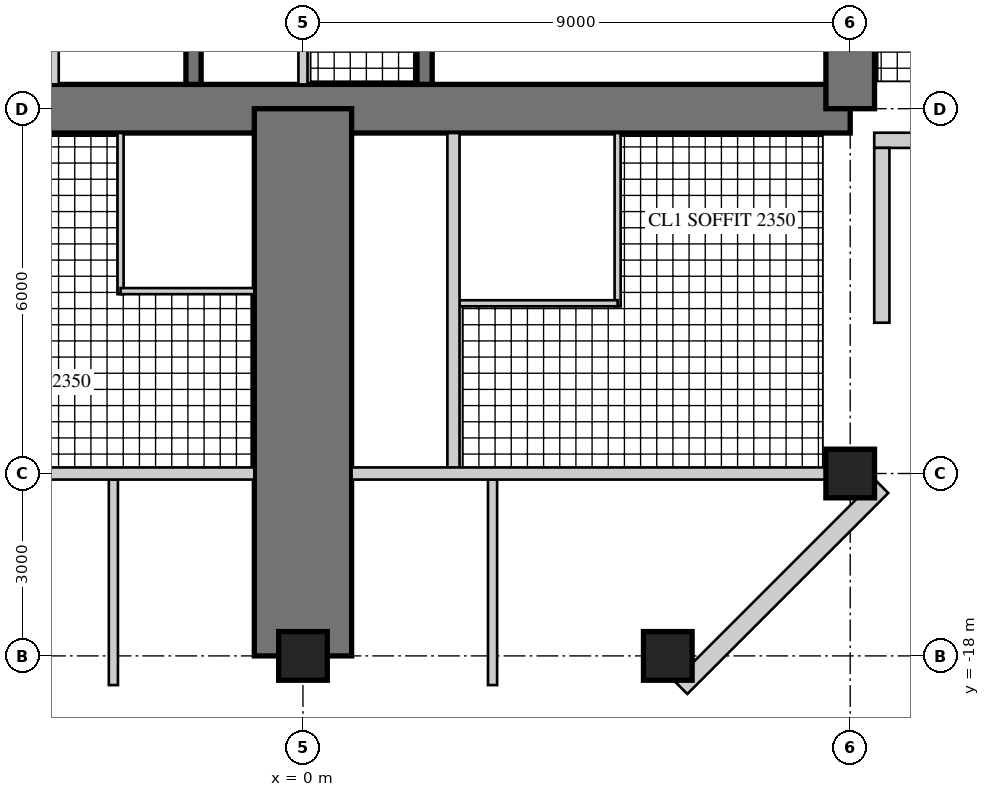
"""IFC4 building model, lengths in metres.
Left out: names, types, materials, properties, quantities, classifications, styles, units other than length and angle.
Written with IfcOpenShell. Run it as: python <this file> out.ifc"""

import sys

from ifc_helpers import new_model, si_unit, direction, frame, frame_2d, origin, origin_2d, place, context, subcontext, project, spatial, rectangle, hollow_rectangle, extrude, element, fill, save


model = new_model("IFC4")
c1 = context("Model", 3, precision=1e-05, world=origin(), true_north=direction((0.0, 1.0)))
c2 = subcontext(c1, "Body", "Model", "MODEL_VIEW")
j1 = project(units=[si_unit("LENGTHUNIT", "METRE"), si_unit("PLANEANGLEUNIT", "RADIAN")], contexts=[c1])
p1 = place(None, origin())
s1 = spatial("IfcSite", under=j1, at=p1, CompositionType="ELEMENT")
p2 = place(p1, origin())
s2 = spatial("IfcBuilding", under=s1, at=p2, CompositionType="ELEMENT")
p3 = place(p2, frame((0.0, 0.0, 225.5)))
s3 = spatial("IfcBuildingStorey", under=s2, at=p3, CompositionType="ELEMENT", Elevation=225.5)
p4 = place(p3, frame((-9.0, -9.0, 0.0), z_axis=(0.0, 0.0, 1.0), x_axis=(1.0, 0.0, 0.0)))
e1 = element("IfcWall", 1, at=p4, inside=s3, PredefinedType="SHEAR", context=c2, shape_type="SweptSolid", body=[
    extrude(rectangle(XDim=18.0, YDim=0.8, at=frame_2d((9.0, 0.0))), origin(), (0.0, 0.0, 1.0), 3.4),
])
p5 = place(p4, frame((9.8, 0.0, 0.0)))
e2 = element("IfcOpeningElement", 2, at=p5, cuts=e1, PredefinedType="OPENING", context=c2, shape_type="SweptSolid", body=[
    extrude(rectangle(XDim=1.0, YDim=2.4, at=frame_2d((0.5, 1.2))), frame((0.0, 0.41, 0.0), z_axis=(0.0, -1.0, 0.0), x_axis=(1.0, 0.0, 0.0)), (0.0, 0.0, 1.0), 0.82),
])
p6 = place(p3, frame((9.0, -9.0, 0.0), z_axis=(0.0, 0.0, 1.0), x_axis=(0.0, 1.0, 0.0)))
e3 = element("IfcWall", 3, at=p6, inside=s3, PredefinedType="SHEAR", context=c2, shape_type="SweptSolid", body=[
    extrude(rectangle(XDim=18.0, YDim=0.8, at=frame_2d((9.0, 0.0))), origin(), (0.0, 0.0, 1.0), 3.4),
])
p7 = place(p6, frame((9.8, 0.0, 0.0)))
e4 = element("IfcOpeningElement", 4, at=p7, cuts=e3, PredefinedType="OPENING", context=c2, shape_type="SweptSolid", body=[
    extrude(rectangle(XDim=1.0, YDim=2.4, at=frame_2d((0.5, 1.2))), frame((0.0, 0.41, 0.0), z_axis=(0.0, -1.0, 0.0), x_axis=(1.0, 0.0, 0.0)), (0.0, 0.0, 1.0), 0.82),
])
p8 = place(p3, frame((-1.8, -1.875, 0.0), z_axis=(0.0, 0.0, 1.0), x_axis=(0.0, -1.0, 0.0)))
e5 = element("IfcWall", 5, at=p8, inside=s3, PredefinedType="SHEAR", context=c2, shape_type="SweptSolid", body=[
    extrude(rectangle(XDim=6.725, YDim=0.25, at=frame_2d((3.363, 0.0))), origin(), (0.0, 0.0, 1.0), 3.4),
])
p9 = place(p8, frame((1.875, 0.0, 0.0)))
e6 = element("IfcOpeningElement", 6, at=p9, cuts=e5, PredefinedType="OPENING", context=c2, shape_type="SweptSolid", body=[
    extrude(rectangle(XDim=1.6, YDim=2.4, at=frame_2d((0.8, 1.2))), frame((0.0, 0.135, 0.0), z_axis=(0.0, -1.0, 0.0), x_axis=(1.0, 0.0, 0.0)), (0.0, 0.0, 1.0), 0.27),
])
p10 = place(p3, frame((-4.117, -5.975, 0.0), z_axis=(0.0, 0.0, 1.0), x_axis=(0.0, -1.0, 0.0)))
e7 = element("IfcWall", 7, at=p10, inside=s3, PredefinedType="PARTITIONING", context=c2, shape_type="SweptSolid", body=[
    extrude(rectangle(XDim=2.625, YDim=0.2, at=frame_2d((1.312, 0.0))), origin(), (0.0, 0.0, 1.0), 3.4),
])
p11 = place(p3, frame((2.0, -1.675, 0.0), z_axis=(0.0, 0.0, 1.0), x_axis=(0.0, -1.0, 0.0)))
e8 = element("IfcWall", 8, at=p11, inside=s3, PredefinedType="SHEAR", context=c2, shape_type="SweptSolid", body=[
    extrude(rectangle(XDim=6.925, YDim=0.25, at=frame_2d((3.462, 0.0))), origin(), (0.0, 0.0, 1.0), 3.4),
])
p12 = place(p11, frame((0.725, 0.0, 0.0)))
e9 = element("IfcOpeningElement", 9, at=p12, cuts=e8, PredefinedType="OPENING", context=c2, shape_type="SweptSolid", body=[
    extrude(rectangle(XDim=1.0, YDim=2.1, at=frame_2d((0.5, 1.05))), frame((0.0, 0.135, 0.0), z_axis=(0.0, -1.0, 0.0), x_axis=(1.0, 0.0, 0.0)), (0.0, 0.0, 1.0), 0.27),
])
p13 = place(p3, frame((0.0, -9.0, 0.0), z_axis=(0.0, 0.0, 1.0), x_axis=(0.0, -1.0, 0.0)))
e10 = element("IfcWall", 10, at=p13, inside=s3, PredefinedType="SHEAR", context=c2, shape_type="SweptSolid", body=[
    extrude(rectangle(XDim=9.0, YDim=1.6, at=frame_2d((4.5, 0.0))), origin(), (0.0, 0.0, 1.0), 3.4),
])
p14 = place(p13, frame((3.8, 0.0, 0.0)))
e11 = element("IfcOpeningElement", 11, at=p14, cuts=e10, PredefinedType="OPENING", context=c2, shape_type="SweptSolid", body=[
    extrude(rectangle(XDim=1.0, YDim=2.15, at=frame_2d((0.5, 1.075))), frame((0.0, 0.81, 0.0), z_axis=(0.0, -1.0, 0.0), x_axis=(1.0, 0.0, 0.0)), (0.0, 0.0, 1.0), 1.62),
])
p15 = place(p13, frame((7.0, 0.0, 0.0)))
e12 = element("IfcOpeningElement", 12, at=p15, cuts=e10, PredefinedType="OPENING", context=c2, shape_type="SweptSolid", body=[
    extrude(rectangle(XDim=1.0, YDim=2.2, at=frame_2d((0.5, 1.1))), frame((0.0, 0.81, 0.0), z_axis=(0.0, -1.0, 0.0), x_axis=(1.0, 0.0, 0.0)), (0.0, 0.0, 1.0), 1.62),
])
for number, where, z_axis, x_axis in (
    (13, (9.0, -15.0, 0.0), (0.0, 0.0, 1.0), (1.0, 0.0, 0.0)),
    (14, (0.0, -18.0, 0.0), (0.0, 0.0, 1.0), (1.0, 0.0, 0.0)),
    (15, (6.0, -18.0, 0.0), (0.0, 0.0, 1.0), (1.0, 0.0, 0.0)),
):
    element("IfcColumn", number, at=place(p3, frame(where, z_axis=z_axis, x_axis=x_axis)), inside=s3, PredefinedType="COLUMN", context=c2, shape_type="SweptSolid", body=[
        extrude(rectangle(XDim=0.8, YDim=0.8, at=origin_2d()), origin(), (0.0, 0.0, 1.0), 3.4),
    ])
p16 = place(p3, frame((9.395, -9.52, 0.0), z_axis=(0.0, 0.0, 1.0), x_axis=(1.0, 0.0, 0.0)))
e16 = element("IfcWall", 16, at=p16, inside=s3, PredefinedType="SOLIDWALL", context=c2, shape_type="SweptSolid", body=[
    extrude(rectangle(XDim=3.125, YDim=0.25, at=frame_2d((1.562, 0.0))), origin(), (0.0, 0.0, 1.0), 3.22),
])
p17 = place(p16, frame((0.6, 0.0, 0.0)))
e17 = element("IfcOpeningElement", 17, at=p17, cuts=e16, PredefinedType="OPENING", context=c2, shape_type="SweptSolid", body=[
    extrude(rectangle(XDim=1.0, YDim=2.2, at=frame_2d((0.5, 1.1))), frame((0.0, 0.135, 0.0), z_axis=(0.0, -1.0, 0.0), x_axis=(1.0, 0.0, 0.0)), (0.0, 0.0, 1.0), 0.27),
])
p18 = place(p3, frame((6.215, -18.52, 0.0), z_axis=(0.0, 0.0, 1.0), x_axis=(0.707106781187, 0.707106781187, 0.0)))
e18 = element("IfcWall", 18, at=p18, inside=s3, PredefinedType="SOLIDWALL", context=c2, shape_type="SweptSolid", body=[
    extrude(rectangle(XDim=4.674, YDim=0.3, at=frame_2d((2.337, 0.0))), origin(), (0.0, 0.0, 1.0), 3.22),
])
p19 = place(p18, frame((1.887, 0.0, 0.3)))
e19 = element("IfcOpeningElement", 19, at=p19, cuts=e18, PredefinedType="OPENING", context=c2, shape_type="SweptSolid", body=[
    extrude(rectangle(XDim=0.9, YDim=2.4, at=frame_2d((0.45, 1.2))), frame((0.0, 0.16, 0.0), z_axis=(0.0, -1.0, 0.0), x_axis=(1.0, 0.0, 0.0)), (0.0, 0.0, 1.0), 0.32),
])
p20 = place(p3, frame((9.52, -12.52, 0.0), z_axis=(0.0, 0.0, 1.0), x_axis=(0.0, 1.0, 0.0)))
e20 = element("IfcWall", 20, at=p20, inside=s3, PredefinedType="SOLIDWALL", context=c2, shape_type="SweptSolid", body=[
    extrude(rectangle(XDim=2.875, YDim=0.25, at=frame_2d((1.438, 0.0))), origin(), (0.0, 0.0, 1.0), 3.22),
])
p21 = place(p20, frame((0.6, 0.0, 0.0)))
e21 = element("IfcOpeningElement", 21, at=p21, cuts=e20, PredefinedType="OPENING", context=c2, shape_type="SweptSolid", body=[
    extrude(rectangle(XDim=1.0, YDim=2.2, at=frame_2d((0.5, 1.1))), frame((0.0, 0.135, 0.0), z_axis=(0.0, -1.0, 0.0), x_axis=(1.0, 0.0, 0.0)), (0.0, 0.0, 1.0), 0.27),
])
p22 = place(p3, frame((0.0, -5.675, 0.0), z_axis=(0.0, 0.0, 1.0), x_axis=(0.0, -1.0, 0.0)))
e22 = element("IfcWall", 22, at=p22, inside=s3, PredefinedType="PARTITIONING", context=c2, shape_type="SweptSolid", body=[
    extrude(rectangle(XDim=2.925, YDim=0.15, at=frame_2d((1.462, 0.0))), origin(), (0.0, 0.0, 1.0), 3.22),
])
p23 = place(p22, frame((0.4, 0.0, 0.0)))
e23 = element("IfcOpeningElement", 23, at=p23, cuts=e22, PredefinedType="OPENING", context=c2, shape_type="SweptSolid", body=[
    extrude(rectangle(XDim=1.0, YDim=2.1, at=frame_2d((0.5, 1.05))), frame((0.0, 0.085, 0.0), z_axis=(0.0, -1.0, 0.0), x_axis=(1.0, 0.0, 0.0)), (0.0, 0.0, 1.0), 0.17),
])
p24 = place(p3, frame((5.175, -9.4, 0.0), z_axis=(0.0, 0.0, 1.0), x_axis=(0.0, -1.0, 0.0)))
e24 = element("IfcWall", 24, at=p24, inside=s3, PredefinedType="PARTITIONING", context=c2, shape_type="SweptSolid", body=[
    extrude(rectangle(XDim=2.85, YDim=0.1, at=frame_2d((1.425, 0.0))), origin(), (0.0, 0.0, 1.0), 3.22),
])
p25 = place(p3, frame((2.575, -12.2, 0.0), z_axis=(0.0, 0.0, 1.0), x_axis=(1.0, 0.0, 0.0)))
e25 = element("IfcWall", 25, at=p25, inside=s3, PredefinedType="PARTITIONING", context=c2, shape_type="SweptSolid", body=[
    extrude(rectangle(XDim=2.6, YDim=0.1, at=frame_2d((1.3, 0.0))), origin(), (0.0, 0.0, 1.0), 3.22),
])
p26 = place(p25, frame((0.55, 0.0, 0.0)))
e26 = element("IfcOpeningElement", 26, at=p26, cuts=e25, PredefinedType="OPENING", context=c2, shape_type="SweptSolid", body=[
    extrude(rectangle(XDim=0.9, YDim=2.1, at=frame_2d((0.45, 1.05))), frame((0.0, 0.06, 0.0), z_axis=(0.0, -1.0, 0.0), x_axis=(1.0, 0.0, 0.0)), (0.0, 0.0, 1.0), 0.12),
])
p27 = place(p3, frame((-3.0, -9.4, 0.0), z_axis=(0.0, 0.0, 1.0), x_axis=(0.0, -1.0, 0.0)))
e27 = element("IfcWall", 27, at=p27, inside=s3, PredefinedType="PARTITIONING", context=c2, shape_type="SweptSolid", body=[
    extrude(rectangle(XDim=2.65, YDim=0.1, at=frame_2d((1.325, 0.0))), origin(), (0.0, 0.0, 1.0), 3.22),
])
p28 = place(p3, frame((-3.0, -12.0, 0.0), z_axis=(0.0, 0.0, 1.0), x_axis=(1.0, 0.0, 0.0)))
e28 = element("IfcWall", 28, at=p28, inside=s3, PredefinedType="PARTITIONING", context=c2, shape_type="SweptSolid", body=[
    extrude(rectangle(XDim=2.2, YDim=0.1, at=frame_2d((1.1, 0.0))), origin(), (0.0, 0.0, 1.0), 3.22),
])
p29 = place(p28, frame((0.55, 0.0, 0.0)))
e29 = element("IfcOpeningElement", 29, at=p29, cuts=e28, PredefinedType="OPENING", context=c2, shape_type="SweptSolid", body=[
    extrude(rectangle(XDim=0.9, YDim=2.1, at=frame_2d((0.45, 1.05))), frame((0.0, 0.06, 0.0), z_axis=(0.0, -1.0, 0.0), x_axis=(1.0, 0.0, 0.0)), (0.0, 0.0, 1.0), 0.12),
])
p30 = place(p3, frame((2.475, -9.4, 0.0), z_axis=(0.0, 0.0, 1.0), x_axis=(0.0, -1.0, 0.0)))
e30 = element("IfcWall", 30, at=p30, inside=s3, PredefinedType="SOLIDWALL", context=c2, shape_type="SweptSolid", body=[
    extrude(rectangle(XDim=5.6, YDim=0.2, at=frame_2d((2.8, 0.0))), origin(), (0.0, 0.0, 1.0), 3.22),
])
p31 = place(p30, frame((3.4, 0.0, 0.0)))
e31 = element("IfcOpeningElement", 31, at=p31, cuts=e30, PredefinedType="OPENING", context=c2, shape_type="SweptSolid", body=[
    extrude(rectangle(XDim=1.0, YDim=2.15, at=frame_2d((0.5, 1.075))), frame((0.0, 0.11, 0.0), z_axis=(0.0, -1.0, 0.0), x_axis=(1.0, 0.0, 0.0)), (0.0, 0.0, 1.0), 0.22),
])
p32 = place(p3, frame((3.118, -15.1, 0.0), z_axis=(0.0, 0.0, 1.0), x_axis=(0.0, -1.0, 0.0)))
e32 = element("IfcWall", 32, at=p32, inside=s3, PredefinedType="PARTITIONING", context=c2, shape_type="SweptSolid", body=[
    extrude(rectangle(XDim=3.38, YDim=0.15, at=frame_2d((1.69, 0.0))), origin(), (0.0, 0.0, 1.0), 3.22),
])
p33 = place(p32, frame((0.6, 0.0, 0.0)))
e33 = element("IfcOpeningElement", 33, at=p33, cuts=e32, PredefinedType="OPENING", context=c2, shape_type="SweptSolid", body=[
    extrude(rectangle(XDim=1.0, YDim=2.1, at=frame_2d((0.5, 1.05))), frame((0.0, 0.085, 0.0), z_axis=(0.0, -1.0, 0.0), x_axis=(1.0, 0.0, 0.0)), (0.0, 0.0, 1.0), 0.17),
])
p34 = place(p3, frame((-3.118, -15.1, 0.0), z_axis=(0.0, 0.0, 1.0), x_axis=(0.0, -1.0, 0.0)))
e34 = element("IfcWall", 34, at=p34, inside=s3, PredefinedType="PARTITIONING", context=c2, shape_type="SweptSolid", body=[
    extrude(rectangle(XDim=3.38, YDim=0.15, at=frame_2d((1.69, 0.0))), origin(), (0.0, 0.0, 1.0), 3.22),
])
p35 = place(p34, frame((0.6, 0.0, 0.0)))
e35 = element("IfcOpeningElement", 35, at=p35, cuts=e34, PredefinedType="OPENING", context=c2, shape_type="SweptSolid", body=[
    extrude(rectangle(XDim=1.0, YDim=2.1, at=frame_2d((0.5, 1.05))), frame((0.0, 0.085, 0.0), z_axis=(0.0, -1.0, 0.0), x_axis=(1.0, 0.0, 0.0)), (0.0, 0.0, 1.0), 0.17),
])
p36 = place(p3, frame((-8.6, -15.0, 0.0), z_axis=(0.0, 0.0, 1.0), x_axis=(1.0, 0.0, 0.0)))
e36 = element("IfcWall", 36, at=p36, inside=s3, PredefinedType="SOLIDWALL", context=c2, shape_type="SweptSolid", body=[
    extrude(rectangle(XDim=7.8, YDim=0.2, at=frame_2d((3.9, 0.0))), origin(), (0.0, 0.0, 1.0), 2.52),
])
p37 = place(p3, frame((0.8, -15.0, 0.0), z_axis=(0.0, 0.0, 1.0), x_axis=(1.0, 0.0, 0.0)))
e37 = element("IfcWall", 37, at=p37, inside=s3, PredefinedType="SOLIDWALL", context=c2, shape_type="SweptSolid", body=[
    extrude(rectangle(XDim=7.8, YDim=0.2, at=frame_2d((3.9, 0.0))), origin(), (0.0, 0.0, 1.0), 2.52),
])
p38 = place(p37, frame((0.35, 0.0, 0.0)))
e38 = element("IfcOpeningElement", 38, at=p38, cuts=e37, PredefinedType="OPENING", context=c2, shape_type="SweptSolid", body=[
    extrude(rectangle(XDim=1.0, YDim=2.2, at=frame_2d((0.5, 1.1))), frame((0.0, 0.11, 0.0), z_axis=(0.0, -1.0, 0.0), x_axis=(1.0, 0.0, 0.0)), (0.0, 0.0, 1.0), 0.22),
])
p39 = place(p17, origin())
e39 = element("IfcDoor", 39, at=p39, inside=s3, OperationType="SINGLE_SWING_LEFT", PredefinedType="DOOR", context=c2, shape_type="SweptSolid", body=[
    extrude(hollow_rectangle(XDim=1.0, YDim=2.2, WallThickness=0.06, at=frame_2d((0.5, 1.1))), frame((0.0, 0.025, 0.0), z_axis=(0.0, -1.0, 0.0), x_axis=(1.0, 0.0, 0.0)), (0.0, 0.0, 1.0), 0.05),
    extrude(rectangle(XDim=0.879, YDim=2.079, at=frame_2d((0.5, 1.1))), frame((0.0, 0.025, 0.0), z_axis=(0.0, -1.0, 0.0), x_axis=(1.0, 0.0, 0.0)), (0.0, 0.0, 1.0), 0.05),
])
fill(e17, e39)
p40 = place(p19, origin())
e40 = element("IfcWindow", 40, at=p40, inside=s3, PartitioningType="SINGLE_PANEL", PredefinedType="WINDOW", context=c2, shape_type="SweptSolid", body=[
    extrude(hollow_rectangle(XDim=0.9, YDim=2.4, WallThickness=0.06, at=frame_2d((0.45, 1.2))), frame((0.0, 0.03, 0.0), z_axis=(0.0, -1.0, 0.0), x_axis=(1.0, 0.0, 0.0)), (0.0, 0.0, 1.0), 0.06),
    extrude(rectangle(XDim=0.779, YDim=2.279, at=frame_2d((0.45, 1.2))), frame((0.0, 0.03, 0.0), z_axis=(0.0, -1.0, 0.0), x_axis=(1.0, 0.0, 0.0)), (0.0, 0.0, 1.0), 0.06),
])
fill(e19, e40)
p41 = place(p21, origin())
e41 = element("IfcDoor", 41, at=p41, inside=s3, OperationType="SINGLE_SWING_RIGHT", PredefinedType="DOOR", context=c2, shape_type="SweptSolid", body=[
    extrude(hollow_rectangle(XDim=1.0, YDim=2.2, WallThickness=0.06, at=frame_2d((0.5, 1.1))), frame((0.0, 0.025, 0.0), z_axis=(0.0, -1.0, 0.0), x_axis=(1.0, 0.0, 0.0)), (0.0, 0.0, 1.0), 0.05),
    extrude(rectangle(XDim=0.879, YDim=2.079, at=frame_2d((0.5, 1.1))), frame((0.0, 0.025, 0.0), z_axis=(0.0, -1.0, 0.0), x_axis=(1.0, 0.0, 0.0)), (0.0, 0.0, 1.0), 0.05),
])
fill(e21, e41)
p42 = place(p26, origin())
e42 = element("IfcDoor", 42, at=p42, inside=s3, OperationType="SINGLE_SWING_LEFT", PredefinedType="DOOR", context=c2, shape_type="SweptSolid", body=[
    extrude(rectangle(XDim=0.9, YDim=2.1, at=frame_2d((0.45, 1.05))), frame((0.0, 0.025, 0.0), z_axis=(0.0, -1.0, 0.0), x_axis=(1.0, 0.0, 0.0)), (0.0, 0.0, 1.0), 0.05),
])
fill(e26, e42)
p43 = place(p29, origin())
e43 = element("IfcDoor", 43, at=p43, inside=s3, OperationType="SINGLE_SWING_LEFT", PredefinedType="DOOR", context=c2, shape_type="SweptSolid", body=[
    extrude(rectangle(XDim=0.9, YDim=2.1, at=frame_2d((0.45, 1.05))), frame((0.0, 0.025, 0.0), z_axis=(0.0, -1.0, 0.0), x_axis=(1.0, 0.0, 0.0)), (0.0, 0.0, 1.0), 0.05),
])
fill(e29, e43)
p44 = place(p31, origin())
e44 = element("IfcDoor", 44, at=p44, inside=s3, OperationType="SINGLE_SWING_LEFT", PredefinedType="DOOR", context=c2, shape_type="SweptSolid", body=[
    extrude(rectangle(XDim=1.0, YDim=2.15, at=frame_2d((0.5, 1.075))), frame((0.0, 0.025, 0.0), z_axis=(0.0, -1.0, 0.0), x_axis=(1.0, 0.0, 0.0)), (0.0, 0.0, 1.0), 0.05),
])
fill(e31, e44)
p45 = place(p33, frame((1.0, 0.0, 0.0), z_axis=(0.0, 0.0, 1.0), x_axis=(-1.0, 0.0, 0.0)))
e45 = element("IfcDoor", 45, at=p45, inside=s3, OperationType="SINGLE_SWING_LEFT", PredefinedType="DOOR", context=c2, shape_type="SweptSolid", body=[
    extrude(rectangle(XDim=1.0, YDim=2.1, at=frame_2d((0.5, 1.05))), frame((0.0, 0.025, 0.0), z_axis=(0.0, -1.0, 0.0), x_axis=(1.0, 0.0, 0.0)), (0.0, 0.0, 1.0), 0.05),
])
fill(e33, e45)
p46 = place(p35, origin())
e46 = element("IfcDoor", 46, at=p46, inside=s3, OperationType="SINGLE_SWING_LEFT", PredefinedType="DOOR", context=c2, shape_type="SweptSolid", body=[
    extrude(rectangle(XDim=1.0, YDim=2.1, at=frame_2d((0.5, 1.05))), frame((0.0, 0.025, 0.0), z_axis=(0.0, -1.0, 0.0), x_axis=(1.0, 0.0, 0.0)), (0.0, 0.0, 1.0), 0.05),
])
fill(e35, e46)
p47 = place(p38, frame((1.0, 0.0, 0.0), z_axis=(0.0, 0.0, 1.0), x_axis=(-1.0, 0.0, 0.0)))
e47 = element("IfcDoor", 47, at=p47, inside=s3, OperationType="SINGLE_SWING_LEFT", PredefinedType="DOOR", context=c2, shape_type="SweptSolid", body=[
    extrude(rectangle(XDim=1.0, YDim=2.2, at=frame_2d((0.5, 1.1))), frame((0.0, 0.025, 0.0), z_axis=(0.0, -1.0, 0.0), x_axis=(1.0, 0.0, 0.0)), (0.0, 0.0, 1.0), 0.05),
])
fill(e38, e47)
p48 = place(p14, frame((1.0, 0.0, 0.0), z_axis=(0.0, 0.0, 1.0), x_axis=(-1.0, 0.0, 0.0)))
e48 = element("IfcDoor", 48, at=p48, inside=s3, OperationType="SINGLE_SWING_RIGHT", PredefinedType="DOOR", context=c2, shape_type="SweptSolid", body=[
    extrude(rectangle(XDim=1.0, YDim=2.15, at=frame_2d((0.5, 1.075))), frame((0.0, 0.025, 0.0), z_axis=(0.0, -1.0, 0.0), x_axis=(1.0, 0.0, 0.0)), (0.0, 0.0, 1.0), 0.05),
])
fill(e11, e48)
p49 = place(p15, origin())
e49 = element("IfcDoor", 49, at=p49, inside=s3, OperationType="SINGLE_SWING_LEFT", PredefinedType="DOOR", context=c2, shape_type="SweptSolid", body=[
    extrude(rectangle(XDim=1.0, YDim=2.2, at=frame_2d((0.5, 1.1))), frame((0.0, 0.025, 0.0), z_axis=(0.0, -1.0, 0.0), x_axis=(1.0, 0.0, 0.0)), (0.0, 0.0, 1.0), 0.05),
])
fill(e12, e49)
p50 = place(p5, origin())
e50 = element("IfcDoor", 50, at=p50, inside=s3, OperationType="SINGLE_SWING_RIGHT", PredefinedType="DOOR", context=c2, shape_type="SweptSolid", body=[
    extrude(rectangle(XDim=1.0, YDim=2.4, at=frame_2d((0.5, 1.2))), frame((0.0, 0.055, 0.0), z_axis=(0.0, -1.0, 0.0), x_axis=(1.0, 0.0, 0.0)), (0.0, 0.0, 1.0), 0.05),
])
fill(e2, e50)
save(model, sys.argv[1])
